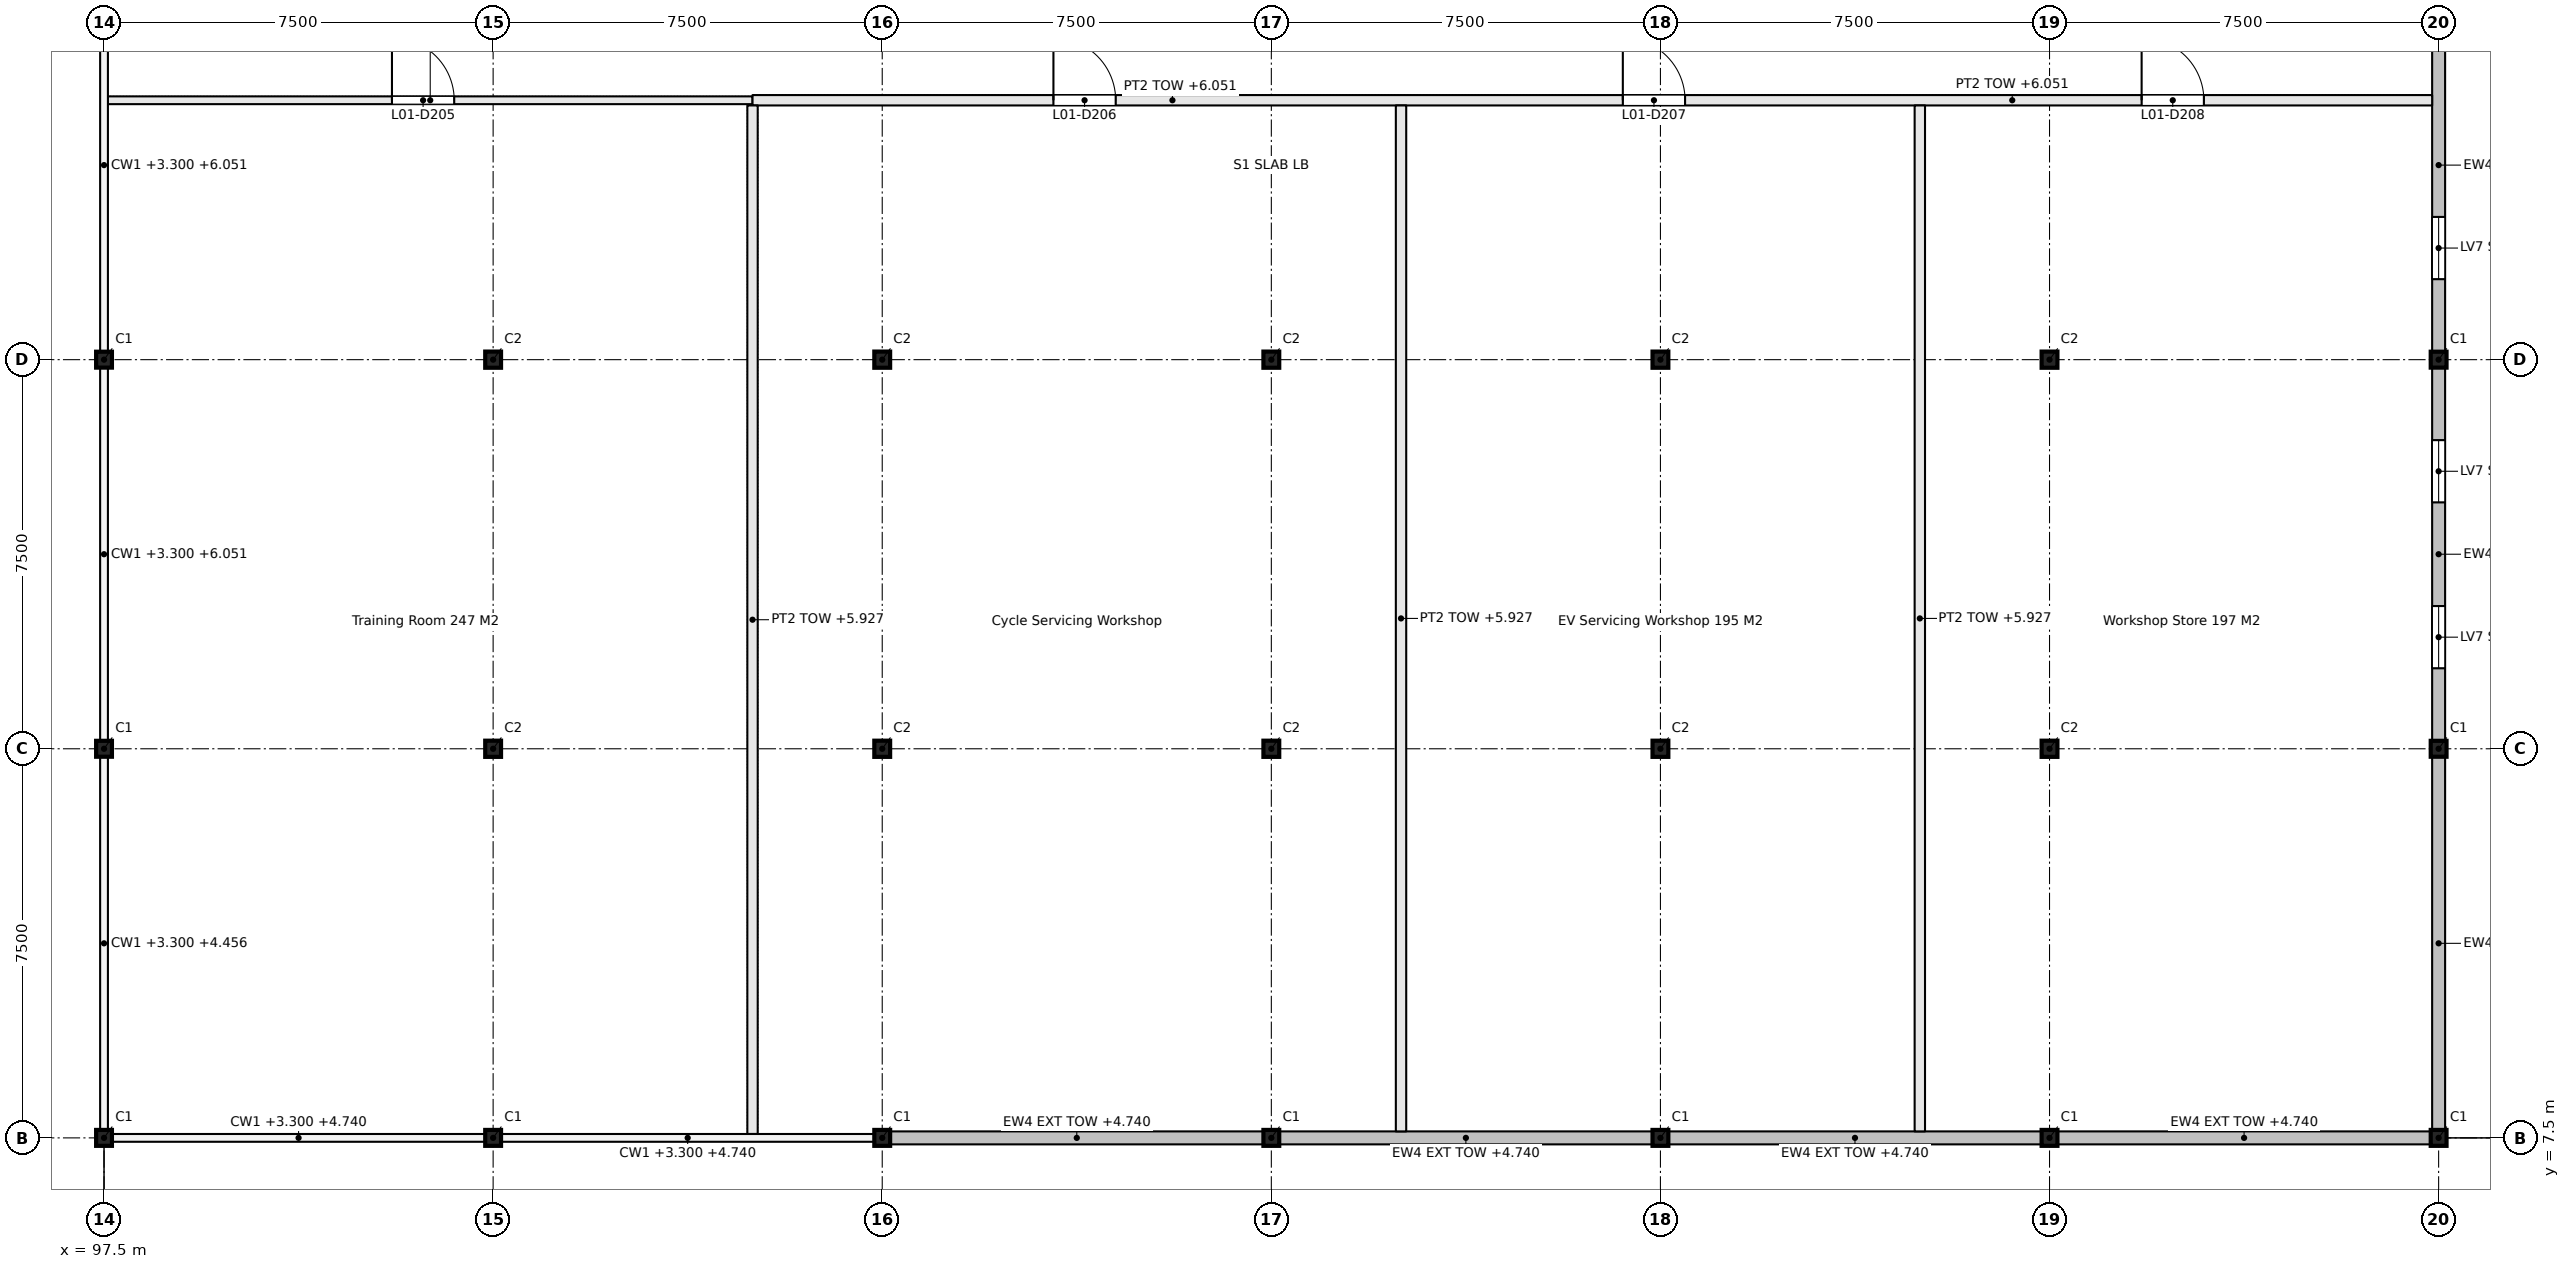
"""IFC4 building model, lengths in metres.
Left out: names, types, materials, properties, quantities, classifications, styles, units other than length and angle.
Written with IfcOpenShell. Run it as: python <this file> out.ifc"""

import sys

from ifc_helpers import new_model, si_unit, direction, frame, frame_2d, origin, origin_2d, place, context, subcontext, project, spatial, rectangle, i_section, extrude, element, fill, save


model = new_model("IFC4")
c1 = context("Model", 3, precision=1e-05, world=origin(), true_north=direction((0.0, 1.0)))
c2 = subcontext(c1, "Body", "Model", "MODEL_VIEW")
j1 = project(units=[si_unit("LENGTHUNIT", "METRE"), si_unit("PLANEANGLEUNIT", "RADIAN")], contexts=[c1])
p1 = place(None, origin())
s1 = spatial("IfcSite", under=j1, at=p1, CompositionType="ELEMENT")
p2 = place(p1, origin())
s2 = spatial("IfcBuilding", under=s1, at=p2, CompositionType="ELEMENT")
p3 = place(p2, frame((0.0, 0.0, 3.3)))
s3 = spatial("IfcBuildingStorey", under=s2, at=p3, CompositionType="ELEMENT", Elevation=3.3)
for number, where, z_axis, x_axis in (
    (1, (97.5, 7.5, 0.0), (0.0, 0.0, 1.0), (1.0, 0.0, 0.0)),
    (2, (97.5, 15.0, 0.0), (0.0, 0.0, 1.0), (1.0, 0.0, 0.0)),
    (3, (97.5, 22.5, 0.0), (0.0, 0.0, 1.0), (1.0, 0.0, 0.0)),
    (4, (105.0, 7.5, 0.0), (0.0, 0.0, 1.0), (1.0, 0.0, 0.0)),
):
    element("IfcColumn", number, at=place(p3, frame(where, z_axis=z_axis, x_axis=x_axis)), inside=s3, PredefinedType="COLUMN", context=c2, shape_type="SweptSolid", body=[
        extrude(i_section(OverallWidth=0.305, OverallDepth=0.307, WebThickness=0.01, FlangeThickness=0.015, FilletRadius=0.015, at=origin_2d()), origin(), (0.0, 0.0, 1.0), 3.3),
    ])
for number, where, z_axis, x_axis in (
    (5, (105.0, 15.0, 0.0), (0.0, 0.0, 1.0), (1.0, 0.0, 0.0)),
    (6, (105.0, 22.5, 0.0), (0.0, 0.0, 1.0), (1.0, 0.0, 0.0)),
):
    element("IfcColumn", number, at=place(p3, frame(where, z_axis=z_axis, x_axis=x_axis)), inside=s3, PredefinedType="COLUMN", context=c2, shape_type="SweptSolid", body=[
        extrude(i_section(OverallWidth=0.305, OverallDepth=0.312, WebThickness=0.011, FlangeThickness=0.017, FilletRadius=0.015, at=origin_2d()), origin(), (0.0, 0.0, 1.0), 3.3),
    ])
p4 = place(p3, frame((112.5, 7.5, 0.0), z_axis=(0.0, 0.0, 1.0), x_axis=(1.0, 0.0, 0.0)))
e7 = element("IfcColumn", 7, at=p4, inside=s3, PredefinedType="COLUMN", context=c2, shape_type="SweptSolid", body=[
    extrude(i_section(OverallWidth=0.305, OverallDepth=0.307, WebThickness=0.01, FlangeThickness=0.015, FilletRadius=0.015, at=origin_2d()), origin(), (0.0, 0.0, 1.0), 3.3),
])
for number, where, z_axis, x_axis in (
    (8, (112.5, 15.0, 0.0), (0.0, 0.0, 1.0), (1.0, 0.0, 0.0)),
    (9, (112.5, 22.5, 0.0), (0.0, 0.0, 1.0), (1.0, 0.0, 0.0)),
):
    element("IfcColumn", number, at=place(p3, frame(where, z_axis=z_axis, x_axis=x_axis)), inside=s3, PredefinedType="COLUMN", context=c2, shape_type="SweptSolid", body=[
        extrude(i_section(OverallWidth=0.305, OverallDepth=0.312, WebThickness=0.011, FlangeThickness=0.017, FilletRadius=0.015, at=origin_2d()), origin(), (0.0, 0.0, 1.0), 3.3),
    ])
p5 = place(p3, frame((120.0, 7.5, 0.0), z_axis=(0.0, 0.0, 1.0), x_axis=(1.0, 0.0, 0.0)))
e10 = element("IfcColumn", 10, at=p5, inside=s3, PredefinedType="COLUMN", context=c2, shape_type="SweptSolid", body=[
    extrude(i_section(OverallWidth=0.305, OverallDepth=0.307, WebThickness=0.01, FlangeThickness=0.015, FilletRadius=0.015, at=origin_2d()), origin(), (0.0, 0.0, 1.0), 3.3),
])
for number, where, z_axis, x_axis in (
    (11, (120.0, 15.0, 0.0), (0.0, 0.0, 1.0), (1.0, 0.0, 0.0)),
    (12, (120.0, 22.5, 0.0), (0.0, 0.0, 1.0), (1.0, 0.0, 0.0)),
):
    element("IfcColumn", number, at=place(p3, frame(where, z_axis=z_axis, x_axis=x_axis)), inside=s3, PredefinedType="COLUMN", context=c2, shape_type="SweptSolid", body=[
        extrude(i_section(OverallWidth=0.305, OverallDepth=0.312, WebThickness=0.011, FlangeThickness=0.017, FilletRadius=0.015, at=origin_2d()), origin(), (0.0, 0.0, 1.0), 3.3),
    ])
p6 = place(p3, frame((127.5, 7.5, 0.0), z_axis=(0.0, 0.0, 1.0), x_axis=(1.0, 0.0, 0.0)))
e13 = element("IfcColumn", 13, at=p6, inside=s3, PredefinedType="COLUMN", context=c2, shape_type="SweptSolid", body=[
    extrude(i_section(OverallWidth=0.305, OverallDepth=0.307, WebThickness=0.01, FlangeThickness=0.015, FilletRadius=0.015, at=origin_2d()), origin(), (0.0, 0.0, 1.0), 3.3),
])
for number, where, z_axis, x_axis in (
    (14, (127.5, 15.0, 0.0), (0.0, 0.0, 1.0), (1.0, 0.0, 0.0)),
    (15, (127.5, 22.5, 0.0), (0.0, 0.0, 1.0), (1.0, 0.0, 0.0)),
):
    element("IfcColumn", number, at=place(p3, frame(where, z_axis=z_axis, x_axis=x_axis)), inside=s3, PredefinedType="COLUMN", context=c2, shape_type="SweptSolid", body=[
        extrude(i_section(OverallWidth=0.305, OverallDepth=0.312, WebThickness=0.011, FlangeThickness=0.017, FilletRadius=0.015, at=origin_2d()), origin(), (0.0, 0.0, 1.0), 3.3),
    ])
p7 = place(p3, frame((135.0, 7.5, 0.0), z_axis=(0.0, 0.0, 1.0), x_axis=(1.0, 0.0, 0.0)))
e16 = element("IfcColumn", 16, at=p7, inside=s3, PredefinedType="COLUMN", context=c2, shape_type="SweptSolid", body=[
    extrude(i_section(OverallWidth=0.305, OverallDepth=0.307, WebThickness=0.01, FlangeThickness=0.015, FilletRadius=0.015, at=origin_2d()), origin(), (0.0, 0.0, 1.0), 3.3),
])
for number, where, z_axis, x_axis in (
    (17, (135.0, 15.0, 0.0), (0.0, 0.0, 1.0), (1.0, 0.0, 0.0)),
    (18, (135.0, 22.5, 0.0), (0.0, 0.0, 1.0), (1.0, 0.0, 0.0)),
):
    element("IfcColumn", number, at=place(p3, frame(where, z_axis=z_axis, x_axis=x_axis)), inside=s3, PredefinedType="COLUMN", context=c2, shape_type="SweptSolid", body=[
        extrude(i_section(OverallWidth=0.305, OverallDepth=0.312, WebThickness=0.011, FlangeThickness=0.017, FilletRadius=0.015, at=origin_2d()), origin(), (0.0, 0.0, 1.0), 3.3),
    ])
for number, where, z_axis, x_axis in (
    (19, (142.5, 7.5, 0.0), (0.0, 0.0, 1.0), (1.0, 0.0, 0.0)),
    (20, (142.5, 15.0, 0.0), (0.0, 0.0, 1.0), (1.0, 0.0, 0.0)),
    (21, (142.5, 22.5, 0.0), (0.0, 0.0, 1.0), (1.0, 0.0, 0.0)),
):
    element("IfcColumn", number, at=place(p3, frame(where, z_axis=z_axis, x_axis=x_axis)), inside=s3, PredefinedType="COLUMN", context=c2, shape_type="SweptSolid", body=[
        extrude(i_section(OverallWidth=0.305, OverallDepth=0.307, WebThickness=0.01, FlangeThickness=0.015, FilletRadius=0.015, at=origin_2d()), origin(), (0.0, 0.0, 1.0), 3.3),
    ])
p8 = place(p3, frame((97.575, 27.5, 0.0), z_axis=(0.0, 0.0, 1.0), x_axis=(1.0, 0.0, 0.0)))
e22 = element("IfcWall", 22, at=p8, inside=s3, PredefinedType="PARTITIONING", context=c2, shape_type="SweptSolid", body=[
    extrude(rectangle(XDim=12.425, YDim=0.15, at=frame_2d((6.212, 0.0))), origin(), (0.0, 0.0, 1.0), 2.751),
])
p9 = place(p8, frame((5.475, 0.0, 0.0)))
e23 = element("IfcOpeningElement", 23, at=p9, cuts=e22, PredefinedType="OPENING", context=c2, shape_type="SweptSolid", body=[
    extrude(rectangle(XDim=1.2, YDim=2.1, at=frame_2d((0.6, 1.05))), frame((0.0, 0.085, 0.0), z_axis=(0.0, -1.0, 0.0), x_axis=(1.0, 0.0, 0.0)), (0.0, 0.0, 1.0), 0.17),
])
p10 = place(p3, frame((110.0, 27.5, 0.0), z_axis=(0.0, 0.0, 1.0), x_axis=(1.0, 0.0, 0.0)))
e24 = element("IfcWall", 24, at=p10, inside=s3, PredefinedType="PARTITIONING", context=c2, shape_type="SweptSolid", body=[
    extrude(rectangle(XDim=32.375, YDim=0.2, at=frame_2d((16.188, 0.0))), origin(), (0.0, 0.0, 1.0), 2.751),
])
p11 = place(p10, frame((5.8, 0.0, 0.0)))
e25 = element("IfcOpeningElement", 25, at=p11, cuts=e24, PredefinedType="OPENING", context=c2, shape_type="SweptSolid", body=[
    extrude(rectangle(XDim=1.2, YDim=2.1, at=frame_2d((0.6, 1.05))), frame((0.0, 0.11, 0.0), z_axis=(0.0, -1.0, 0.0), x_axis=(1.0, 0.0, 0.0)), (0.0, 0.0, 1.0), 0.22),
])
p12 = place(p10, frame((16.775, 0.0, 0.0)))
e26 = element("IfcOpeningElement", 26, at=p12, cuts=e24, PredefinedType="OPENING", context=c2, shape_type="SweptSolid", body=[
    extrude(rectangle(XDim=1.2, YDim=2.1, at=frame_2d((0.6, 1.05))), frame((0.0, 0.11, 0.0), z_axis=(0.0, -1.0, 0.0), x_axis=(1.0, 0.0, 0.0)), (0.0, 0.0, 1.0), 0.22),
])
p13 = place(p10, frame((26.775, 0.0, 0.0)))
e27 = element("IfcOpeningElement", 27, at=p13, cuts=e24, PredefinedType="OPENING", context=c2, shape_type="SweptSolid", body=[
    extrude(rectangle(XDim=1.2, YDim=2.1, at=frame_2d((0.6, 1.05))), frame((0.0, 0.11, 0.0), z_axis=(0.0, -1.0, 0.0), x_axis=(1.0, 0.0, 0.0)), (0.0, 0.0, 1.0), 0.22),
])
p14 = place(p3, frame((110.0, 7.575, 0.0), z_axis=(0.0, 0.0, 1.0), x_axis=(0.0, 1.0, 0.0)))
e28 = element("IfcWall", 28, at=p14, inside=s3, PredefinedType="PARTITIONING", context=c2, shape_type="SweptSolid", body=[
    extrude(rectangle(XDim=19.825, YDim=0.2, at=frame_2d((9.913, 0.0))), origin(), (0.0, 0.0, 1.0), 2.627),
])
for number, where, z_axis, x_axis in (
    (29, (122.5, 7.625, 0.0), (0.0, 0.0, 1.0), (0.0, 1.0, 0.0)),
    (30, (132.5, 7.625, 0.0), (0.0, 0.0, 1.0), (0.0, 1.0, 0.0)),
):
    element("IfcWall", number, at=place(p3, frame(where, z_axis=z_axis, x_axis=x_axis)), inside=s3, PredefinedType="PARTITIONING", context=c2, shape_type="SweptSolid", body=[
        extrude(rectangle(XDim=19.775, YDim=0.2, at=frame_2d((9.887, 0.0))), origin(), (0.0, 0.0, 1.0), 2.627),
    ])
for number, where, z_axis, x_axis in (
    (31, (112.654, 7.5, 0.0), (0.0, 0.0, 1.0), (1.0, 0.0, 0.0)),
    (32, (120.154, 7.5, 0.0), (0.0, 0.0, 1.0), (1.0, 0.0, 0.0)),
    (33, (127.654, 7.5, 0.0), (0.0, 0.0, 1.0), (1.0, 0.0, 0.0)),
    (34, (135.154, 7.5, 0.0), (0.0, 0.0, 1.0), (1.0, 0.0, 0.0)),
):
    element("IfcWall", number, at=place(p3, frame(where, z_axis=z_axis, x_axis=x_axis)), inside=s3, PredefinedType="SOLIDWALL", context=c2, shape_type="SweptSolid", body=[
        extrude(rectangle(XDim=7.193, YDim=0.25, at=frame_2d((3.596, 0.0))), origin(), (0.0, 0.0, 1.0), 1.44),
    ])
p15 = place(p3, frame((142.5, 7.654, 0.0), z_axis=(0.0, 0.0, 1.0), x_axis=(0.0, 1.0, 0.0)))
e35 = element("IfcWall", 35, at=p15, inside=s3, PredefinedType="SOLIDWALL", context=c2, shape_type="SweptSolid", body=[
    extrude(rectangle(XDim=7.193, YDim=0.25, at=frame_2d((3.596, 0.0))), origin(), (0.0, 0.0, 1.0), 1.156),
])
p16 = place(p3, frame((142.5, 15.154, 0.0), z_axis=(0.0, 0.0, 1.0), x_axis=(0.0, 1.0, 0.0)))
e36 = element("IfcWall", 36, at=p16, inside=s3, PredefinedType="SOLIDWALL", context=c2, shape_type="SweptSolid", body=[
    extrude(rectangle(XDim=7.193, YDim=0.25, at=frame_2d((3.596, 0.0))), origin(), (0.0, 0.0, 1.0), 2.751),
])
p17 = place(p16, frame((1.398, 0.0, 0.4)))
e37 = element("IfcOpeningElement", 37, at=p17, cuts=e36, PredefinedType="OPENING", context=c2, shape_type="SweptSolid", body=[
    extrude(rectangle(XDim=1.2, YDim=1.8, at=frame_2d((0.6, 0.9))), frame((0.0, 0.135, 0.0), z_axis=(0.0, -1.0, 0.0), x_axis=(1.0, 0.0, 0.0)), (0.0, 0.0, 1.0), 0.27),
])
p18 = place(p16, frame((4.595, 0.0, 0.4)))
e38 = element("IfcOpeningElement", 38, at=p18, cuts=e36, PredefinedType="OPENING", context=c2, shape_type="SweptSolid", body=[
    extrude(rectangle(XDim=1.2, YDim=1.8, at=frame_2d((0.6, 0.9))), frame((0.0, 0.135, 0.0), z_axis=(0.0, -1.0, 0.0), x_axis=(1.0, 0.0, 0.0)), (0.0, 0.0, 1.0), 0.27),
])
p19 = place(p3, frame((142.5, 22.654, 0.0), z_axis=(0.0, 0.0, 1.0), x_axis=(0.0, 1.0, 0.0)))
e39 = element("IfcWall", 39, at=p19, inside=s3, PredefinedType="SOLIDWALL", context=c2, shape_type="SweptSolid", body=[
    extrude(rectangle(XDim=7.193, YDim=0.25, at=frame_2d((3.596, 0.0))), origin(), (0.0, 0.0, 1.0), 2.751),
])
p20 = place(p19, frame((1.398, 0.0, 0.4)))
e40 = element("IfcOpeningElement", 40, at=p20, cuts=e39, PredefinedType="OPENING", context=c2, shape_type="SweptSolid", body=[
    extrude(rectangle(XDim=1.2, YDim=1.8, at=frame_2d((0.6, 0.9))), frame((0.0, 0.135, 0.0), z_axis=(0.0, -1.0, 0.0), x_axis=(1.0, 0.0, 0.0)), (0.0, 0.0, 1.0), 0.27),
])
p21 = place(p9, origin())
e41 = element("IfcDoor", 41, at=p21, inside=s3, OperationType="DOUBLE_DOOR_SINGLE_SWING", PredefinedType="DOOR", context=c2, shape_type="SweptSolid", body=[
    extrude(rectangle(XDim=1.2, YDim=2.1, at=frame_2d((0.6, 1.05))), frame((0.0, 0.025, 0.0), z_axis=(0.0, -1.0, 0.0), x_axis=(1.0, 0.0, 0.0)), (0.0, 0.0, 1.0), 0.05),
])
fill(e23, e41)
p22 = place(p11, origin())
e42 = element("IfcDoor", 42, at=p22, inside=s3, OperationType="DOUBLE_DOOR_SINGLE_SWING", PredefinedType="DOOR", context=c2, shape_type="SweptSolid", body=[
    extrude(rectangle(XDim=1.2, YDim=2.1, at=frame_2d((0.6, 1.05))), frame((0.0, 0.025, 0.0), z_axis=(0.0, -1.0, 0.0), x_axis=(1.0, 0.0, 0.0)), (0.0, 0.0, 1.0), 0.05),
])
fill(e25, e42)
p23 = place(p12, origin())
e43 = element("IfcDoor", 43, at=p23, inside=s3, OperationType="DOUBLE_DOOR_SINGLE_SWING", PredefinedType="DOOR", context=c2, shape_type="SweptSolid", body=[
    extrude(rectangle(XDim=1.2, YDim=2.1, at=frame_2d((0.6, 1.05))), frame((0.0, 0.025, 0.0), z_axis=(0.0, -1.0, 0.0), x_axis=(1.0, 0.0, 0.0)), (0.0, 0.0, 1.0), 0.05),
])
fill(e26, e43)
p24 = place(p13, origin())
e44 = element("IfcDoor", 44, at=p24, inside=s3, OperationType="DOUBLE_DOOR_SINGLE_SWING", PredefinedType="DOOR", context=c2, shape_type="SweptSolid", body=[
    extrude(rectangle(XDim=1.2, YDim=2.1, at=frame_2d((0.6, 1.05))), frame((0.0, 0.025, 0.0), z_axis=(0.0, -1.0, 0.0), x_axis=(1.0, 0.0, 0.0)), (0.0, 0.0, 1.0), 0.05),
])
fill(e27, e44)
p25 = place(p17, origin())
e45 = element("IfcWindow", 45, at=p25, inside=s3, PartitioningType="SINGLE_PANEL", PredefinedType="WINDOW", context=c2, shape_type="SweptSolid", body=[
    extrude(rectangle(XDim=1.2, YDim=1.8, at=frame_2d((0.6, 0.9))), frame((0.0, 0.03, 0.0), z_axis=(0.0, -1.0, 0.0), x_axis=(1.0, 0.0, 0.0)), (0.0, 0.0, 1.0), 0.06),
])
fill(e37, e45)
p26 = place(p18, origin())
e46 = element("IfcWindow", 46, at=p26, inside=s3, PartitioningType="SINGLE_PANEL", PredefinedType="WINDOW", context=c2, shape_type="SweptSolid", body=[
    extrude(rectangle(XDim=1.2, YDim=1.8, at=frame_2d((0.6, 0.9))), frame((0.0, 0.03, 0.0), z_axis=(0.0, -1.0, 0.0), x_axis=(1.0, 0.0, 0.0)), (0.0, 0.0, 1.0), 0.06),
])
fill(e38, e46)
p27 = place(p20, origin())
e47 = element("IfcWindow", 47, at=p27, inside=s3, PartitioningType="SINGLE_PANEL", PredefinedType="WINDOW", context=c2, shape_type="SweptSolid", body=[
    extrude(rectangle(XDim=1.2, YDim=1.8, at=frame_2d((0.6, 0.9))), frame((0.0, 0.03, 0.0), z_axis=(0.0, -1.0, 0.0), x_axis=(1.0, 0.0, 0.0)), (0.0, 0.0, 1.0), 0.06),
])
fill(e40, e47)
save(model, sys.argv[1])
